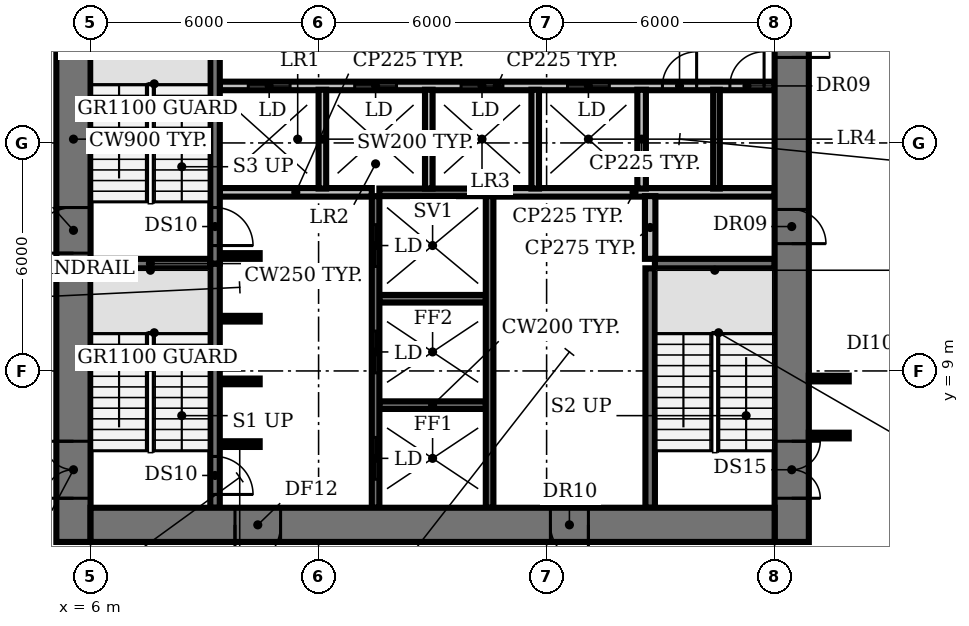
"""IFC4 building model, lengths in metres.
Left out: names, types, materials, properties, quantities, classifications, styles, units other than length and angle.
Written with IfcOpenShell. Run it as: python <this file> out.ifc"""

import sys

from ifc_helpers import new_model, si_unit, direction, frame, frame_2d, origin, place, context, subcontext, project, spatial, rectangle, extrude, element, fill, save


model = new_model("IFC4")
c1 = context("Model", 3, precision=1e-05, world=origin(), true_north=direction((0.0, 1.0)))
c2 = subcontext(c1, "Body", "Model", "MODEL_VIEW")
j1 = project(units=[si_unit("LENGTHUNIT", "METRE"), si_unit("PLANEANGLEUNIT", "RADIAN")], contexts=[c1])
p1 = place(None, origin())
s1 = spatial("IfcSite", under=j1, at=p1, CompositionType="ELEMENT")
p2 = place(p1, origin())
s2 = spatial("IfcBuilding", under=s1, at=p2, CompositionType="ELEMENT")
p3 = place(p2, frame((0.0, 0.0, 58.4)))
s3 = spatial("IfcBuildingStorey", under=s2, at=p3, CompositionType="ELEMENT", Elevation=58.4)
p4 = place(p3, frame((9.4, 7.075, 0.0), z_axis=(0.0, 0.0, 1.0), x_axis=(1.0, 0.0, 0.0)))
e1 = element("IfcWall", 1, at=p4, inside=s3, PredefinedType="SHEAR", context=c2, shape_type="SweptSolid", body=[
    extrude(rectangle(XDim=1.05, YDim=0.15, at=frame_2d((0.525, 0.0))), origin(), (0.0, 0.0, 1.0), 3.85),
])
p5 = place(p3, frame((13.6, 8.1, 0.0), z_axis=(0.0, 0.0, 1.0), x_axis=(1.0, 0.0, 0.0)))
e2 = element("IfcWall", 2, at=p5, inside=s3, PredefinedType="SHEAR", context=c2, shape_type="SweptSolid", body=[
    extrude(rectangle(XDim=2.8, YDim=0.2, at=frame_2d((1.4, 0.0))), origin(), (0.0, 0.0, 1.0), 3.85),
])
for number, where, z_axis, x_axis in (
    (3, (9.4, 8.725, 0.0), (0.0, 0.0, 1.0), (1.0, 0.0, 0.0)),
    (4, (9.4, 10.375, 0.0), (0.0, 0.0, 1.0), (1.0, 0.0, 0.0)),
):
    element("IfcWall", number, at=place(p3, frame(where, z_axis=z_axis, x_axis=x_axis)), inside=s3, PredefinedType="SHEAR", context=c2, shape_type="SweptSolid", body=[
        extrude(rectangle(XDim=1.05, YDim=0.15, at=frame_2d((0.525, 0.0))), origin(), (0.0, 0.0, 1.0), 3.85),
    ])
p6 = place(p3, frame((13.6, 10.9, 0.0), z_axis=(0.0, 0.0, 1.0), x_axis=(1.0, 0.0, 0.0)))
e5 = element("IfcWall", 5, at=p6, inside=s3, PredefinedType="SHEAR", context=c2, shape_type="SweptSolid", body=[
    extrude(rectangle(XDim=2.8, YDim=0.2, at=frame_2d((1.4, 0.0))), origin(), (0.0, 0.0, 1.0), 3.85),
])
for number, where, z_axis, x_axis in (
    (6, (6.0, 11.825, 0.0), (0.0, 0.0, 1.0), (1.0, 0.0, 0.0)),
    (7, (20.85, 11.825, 0.0), (0.0, 0.0, 1.0), (1.0, 0.0, 0.0)),
):
    element("IfcWall", number, at=place(p3, frame(where, z_axis=z_axis, x_axis=x_axis)), inside=s3, PredefinedType="SHEAR", context=c2, shape_type="SweptSolid", body=[
        extrude(rectangle(XDim=3.15, YDim=0.25, at=frame_2d((1.575, 0.0))), origin(), (0.0, 0.0, 1.0), 3.85),
    ])
p7 = place(p3, frame((9.4, 12.025, 0.0), z_axis=(0.0, 0.0, 1.0), x_axis=(1.0, 0.0, 0.0)))
e8 = element("IfcWall", 8, at=p7, inside=s3, PredefinedType="SHEAR", context=c2, shape_type="SweptSolid", body=[
    extrude(rectangle(XDim=1.05, YDim=0.15, at=frame_2d((0.525, 0.0))), origin(), (0.0, 0.0, 1.0), 3.85),
])
p8 = place(p3, frame((9.4, 13.7, 0.0), z_axis=(0.0, 0.0, 1.0), x_axis=(1.0, 0.0, 0.0)))
e9 = element("IfcWall", 9, at=p8, inside=s3, PredefinedType="PARTITIONING", context=c2, shape_type="SweptSolid", body=[
    extrude(rectangle(XDim=4.0, YDim=0.225, at=frame_2d((2.0, 0.0))), origin(), (0.0, 0.0, 1.0), 3.85),
])
p9 = place(p3, frame((13.6, 13.7, 0.0), z_axis=(0.0, 0.0, 1.0), x_axis=(1.0, 0.0, 0.0)))
e10 = element("IfcWall", 10, at=p9, inside=s3, PredefinedType="SHEAR", context=c2, shape_type="SweptSolid", body=[
    extrude(rectangle(XDim=2.8, YDim=0.2, at=frame_2d((1.4, 0.0))), origin(), (0.0, 0.0, 1.0), 3.85),
])
p10 = place(p3, frame((16.6, 13.7, 0.0), z_axis=(0.0, 0.0, 1.0), x_axis=(1.0, 0.0, 0.0)))
e11 = element("IfcWall", 11, at=p10, inside=s3, PredefinedType="PARTITIONING", context=c2, shape_type="SweptSolid", body=[
    extrude(rectangle(XDim=7.4, YDim=0.225, at=frame_2d((3.7, 0.0))), origin(), (0.0, 0.0, 1.0), 3.85),
])
p11 = place(p3, frame((9.4, 16.5, 0.0), z_axis=(0.0, 0.0, 1.0), x_axis=(1.0, 0.0, 0.0)))
e12 = element("IfcWall", 12, at=p11, inside=s3, PredefinedType="PARTITIONING", context=c2, shape_type="SweptSolid", body=[
    extrude(rectangle(XDim=14.6, YDim=0.225, at=frame_2d((7.3, 0.0))), origin(), (0.0, 0.0, 1.0), 3.85),
])
p12 = place(p11, frame((0.75, 0.0, 0.0)))
e13 = element("IfcOpeningElement", 13, at=p12, cuts=e12, PredefinedType="OPENING", context=c2, shape_type="SweptSolid", body=[
    extrude(rectangle(XDim=1.1, YDim=2.1, at=frame_2d((0.55, 1.05))), frame((0.0, 0.123, 0.0), z_axis=(0.0, -1.0, 0.0), x_axis=(1.0, 0.0, 0.0)), (0.0, 0.0, 1.0), 0.245),
])
p13 = place(p11, frame((3.55, 0.0, 0.0)))
e14 = element("IfcOpeningElement", 14, at=p13, cuts=e12, PredefinedType="OPENING", context=c2, shape_type="SweptSolid", body=[
    extrude(rectangle(XDim=1.1, YDim=2.1, at=frame_2d((0.55, 1.05))), frame((0.0, 0.123, 0.0), z_axis=(0.0, -1.0, 0.0), x_axis=(1.0, 0.0, 0.0)), (0.0, 0.0, 1.0), 0.245),
])
p14 = place(p11, frame((6.35, 0.0, 0.0)))
e15 = element("IfcOpeningElement", 15, at=p14, cuts=e12, PredefinedType="OPENING", context=c2, shape_type="SweptSolid", body=[
    extrude(rectangle(XDim=1.1, YDim=2.1, at=frame_2d((0.55, 1.05))), frame((0.0, 0.123, 0.0), z_axis=(0.0, -1.0, 0.0), x_axis=(1.0, 0.0, 0.0)), (0.0, 0.0, 1.0), 0.245),
])
p15 = place(p11, frame((9.15, 0.0, 0.0)))
e16 = element("IfcOpeningElement", 16, at=p15, cuts=e12, PredefinedType="OPENING", context=c2, shape_type="SweptSolid", body=[
    extrude(rectangle(XDim=1.1, YDim=2.1, at=frame_2d((0.55, 1.05))), frame((0.0, 0.123, 0.0), z_axis=(0.0, -1.0, 0.0), x_axis=(1.0, 0.0, 0.0)), (0.0, 0.0, 1.0), 0.245),
])
p16 = place(p11, frame((11.647, 0.0, 0.0)))
e17 = element("IfcOpeningElement", 17, at=p16, cuts=e12, PredefinedType="OPENING", context=c2, shape_type="SweptSolid", body=[
    extrude(rectangle(XDim=0.9, YDim=2.1, at=frame_2d((0.45, 1.05))), frame((0.0, 0.123, 0.0), z_axis=(0.0, -1.0, 0.0), x_axis=(1.0, 0.0, 0.0)), (0.0, 0.0, 1.0), 0.245),
])
p17 = place(p11, frame((13.423, 0.0, 0.0)))
e18 = element("IfcOpeningElement", 18, at=p17, cuts=e12, PredefinedType="OPENING", context=c2, shape_type="SweptSolid", body=[
    extrude(rectangle(XDim=0.9, YDim=2.1, at=frame_2d((0.45, 1.05))), frame((0.0, 0.123, 0.0), z_axis=(0.0, -1.0, 0.0), x_axis=(1.0, 0.0, 0.0)), (0.0, 0.0, 1.0), 0.245),
])
p18 = place(p3, frame((9.275, 11.825, 0.0), z_axis=(0.0, 0.0, 1.0), x_axis=(0.0, -1.0, 0.0)))
e19 = element("IfcWall", 19, at=p18, inside=s3, PredefinedType="SHEAR", context=c2, shape_type="SweptSolid", body=[
    extrude(rectangle(XDim=6.425, YDim=0.25, at=frame_2d((3.212, 0.0))), origin(), (0.0, 0.0, 1.0), 3.85),
])
p19 = place(p18, frame((5.075, 0.0, 0.0)))
e20 = element("IfcOpeningElement", 20, at=p19, cuts=e19, PredefinedType="OPENING", context=c2, shape_type="SweptSolid", body=[
    extrude(rectangle(XDim=1.0, YDim=2.1, at=frame_2d((0.5, 1.05))), frame((0.0, 0.135, 0.0), z_axis=(0.0, -1.0, 0.0), x_axis=(1.0, 0.0, 0.0)), (0.0, 0.0, 1.0), 0.27),
])
p20 = place(p3, frame((9.275, 18.375, 0.0), z_axis=(0.0, 0.0, 1.0), x_axis=(0.0, -1.0, 0.0)))
e21 = element("IfcWall", 21, at=p20, inside=s3, PredefinedType="SHEAR", context=c2, shape_type="SweptSolid", body=[
    extrude(rectangle(XDim=6.55, YDim=0.25, at=frame_2d((3.275, 0.0))), origin(), (0.0, 0.0, 1.0), 3.85),
])
p21 = place(p20, frame((5.075, 0.0, 0.0)))
e22 = element("IfcOpeningElement", 22, at=p21, cuts=e21, PredefinedType="OPENING", context=c2, shape_type="SweptSolid", body=[
    extrude(rectangle(XDim=1.0, YDim=2.1, at=frame_2d((0.5, 1.05))), frame((0.0, 0.135, 0.0), z_axis=(0.0, -1.0, 0.0), x_axis=(1.0, 0.0, 0.0)), (0.0, 0.0, 1.0), 0.27),
])
p22 = place(p3, frame((12.1, 13.8, 0.0), z_axis=(0.0, 0.0, 1.0), x_axis=(0.0, 1.0, 0.0)))
e23 = element("IfcWall", 23, at=p22, inside=s3, PredefinedType="SOLIDWALL", context=c2, shape_type="SweptSolid", body=[
    extrude(rectangle(XDim=2.6, YDim=0.2, at=frame_2d((1.3, 0.0))), origin(), (0.0, 0.0, 1.0), 3.85),
])
p23 = place(p3, frame((13.5, 5.4, 0.0), z_axis=(0.0, 0.0, 1.0), x_axis=(0.0, 1.0, 0.0)))
e24 = element("IfcWall", 24, at=p23, inside=s3, PredefinedType="SHEAR", context=c2, shape_type="SweptSolid", body=[
    extrude(rectangle(XDim=8.2, YDim=0.2, at=frame_2d((4.1, 0.0))), origin(), (0.0, 0.0, 1.0), 3.85),
])
p24 = place(p23, frame((0.75, 0.0, 0.0)))
e25 = element("IfcOpeningElement", 25, at=p24, cuts=e24, PredefinedType="OPENING", context=c2, shape_type="SweptSolid", body=[
    extrude(rectangle(XDim=1.1, YDim=2.1, at=frame_2d((0.55, 1.05))), frame((0.0, 0.11, 0.0), z_axis=(0.0, -1.0, 0.0), x_axis=(1.0, 0.0, 0.0)), (0.0, 0.0, 1.0), 0.22),
])
p25 = place(p23, frame((3.55, 0.0, 0.0)))
e26 = element("IfcOpeningElement", 26, at=p25, cuts=e24, PredefinedType="OPENING", context=c2, shape_type="SweptSolid", body=[
    extrude(rectangle(XDim=1.1, YDim=2.1, at=frame_2d((0.55, 1.05))), frame((0.0, 0.11, 0.0), z_axis=(0.0, -1.0, 0.0), x_axis=(1.0, 0.0, 0.0)), (0.0, 0.0, 1.0), 0.22),
])
p26 = place(p23, frame((6.35, 0.0, 0.0)))
e27 = element("IfcOpeningElement", 27, at=p26, cuts=e24, PredefinedType="OPENING", context=c2, shape_type="SweptSolid", body=[
    extrude(rectangle(XDim=1.1, YDim=2.1, at=frame_2d((0.55, 1.05))), frame((0.0, 0.11, 0.0), z_axis=(0.0, -1.0, 0.0), x_axis=(1.0, 0.0, 0.0)), (0.0, 0.0, 1.0), 0.22),
])
p27 = place(p3, frame((14.9, 13.8, 0.0), z_axis=(0.0, 0.0, 1.0), x_axis=(0.0, 1.0, 0.0)))
e28 = element("IfcWall", 28, at=p27, inside=s3, PredefinedType="SOLIDWALL", context=c2, shape_type="SweptSolid", body=[
    extrude(rectangle(XDim=2.6, YDim=0.2, at=frame_2d((1.3, 0.0))), origin(), (0.0, 0.0, 1.0), 3.85),
])
p28 = place(p3, frame((16.5, 5.4, 0.0), z_axis=(0.0, 0.0, 1.0), x_axis=(0.0, 1.0, 0.0)))
e29 = element("IfcWall", 29, at=p28, inside=s3, PredefinedType="SHEAR", context=c2, shape_type="SweptSolid", body=[
    extrude(rectangle(XDim=8.2, YDim=0.2, at=frame_2d((4.1, 0.0))), origin(), (0.0, 0.0, 1.0), 3.85),
])
p29 = place(p3, frame((17.7, 13.8, 0.0), z_axis=(0.0, 0.0, 1.0), x_axis=(0.0, 1.0, 0.0)))
e30 = element("IfcWall", 30, at=p29, inside=s3, PredefinedType="SOLIDWALL", context=c2, shape_type="SweptSolid", body=[
    extrude(rectangle(XDim=2.6, YDim=0.2, at=frame_2d((1.3, 0.0))), origin(), (0.0, 0.0, 1.0), 3.85),
])
p30 = place(p3, frame((20.5, 13.8, 0.0), z_axis=(0.0, 0.0, 1.0), x_axis=(0.0, 1.0, 0.0)))
e31 = element("IfcWall", 31, at=p30, inside=s3, PredefinedType="PARTITIONING", context=c2, shape_type="SweptSolid", body=[
    extrude(rectangle(XDim=2.6, YDim=0.225, at=frame_2d((1.3, 0.0))), origin(), (0.0, 0.0, 1.0), 3.85),
])
p31 = place(p3, frame((20.725, 5.4, 0.0), z_axis=(0.0, 0.0, 1.0), x_axis=(0.0, 1.0, 0.0)))
e32 = element("IfcWall", 32, at=p31, inside=s3, PredefinedType="SHEAR", context=c2, shape_type="SweptSolid", body=[
    extrude(rectangle(XDim=6.3, YDim=0.25, at=frame_2d((3.15, 0.0))), origin(), (0.0, 0.0, 1.0), 3.85),
])
p32 = place(p3, frame((20.725, 11.95, 0.0), z_axis=(0.0, 0.0, 1.0), x_axis=(0.0, 1.0, 0.0)))
e33 = element("IfcWall", 33, at=p32, inside=s3, PredefinedType="PARTITIONING", context=c2, shape_type="SweptSolid", body=[
    extrude(rectangle(XDim=1.65, YDim=0.275, at=frame_2d((0.825, 0.0))), origin(), (0.0, 0.0, 1.0), 3.85),
])
p33 = place(p3, frame((22.47, 13.8, 0.0), z_axis=(0.0, 0.0, 1.0), x_axis=(0.0, 1.0, 0.0)))
e34 = element("IfcWall", 34, at=p33, inside=s3, PredefinedType="PARTITIONING", context=c2, shape_type="SweptSolid", body=[
    extrude(rectangle(XDim=2.6, YDim=0.175, at=frame_2d((1.3, 0.0))), origin(), (0.0, 0.0, 1.0), 3.85),
])
p34 = place(p3, frame((5.55, 4.5, 0.0), z_axis=(0.0, 0.0, 1.0), x_axis=(0.0, 1.0, 0.0)))
e35 = element("IfcWall", 35, at=p34, inside=s3, PredefinedType="SHEAR", context=c2, shape_type="SweptSolid", body=[
    extrude(rectangle(XDim=21.2, YDim=0.9, at=frame_2d((10.6, 0.0))), origin(), (0.0, 0.0, 1.0), 3.85),
])
p35 = place(p34, frame((1.15, 0.0, 0.0)))
e36 = element("IfcOpeningElement", 36, at=p35, cuts=e35, PredefinedType="OPENING", context=c2, shape_type="SweptSolid", body=[
    extrude(rectangle(XDim=1.5, YDim=2.1, at=frame_2d((0.75, 1.05))), frame((0.0, 0.46, 0.0), z_axis=(0.0, -1.0, 0.0), x_axis=(1.0, 0.0, 0.0)), (0.0, 0.0, 1.0), 0.92),
])
p36 = place(p34, frame((7.6, 0.0, 0.0)))
e37 = element("IfcOpeningElement", 37, at=p36, cuts=e35, PredefinedType="OPENING", context=c2, shape_type="SweptSolid", body=[
    extrude(rectangle(XDim=1.2, YDim=2.1, at=frame_2d((0.6, 1.05))), frame((0.0, 0.46, 0.0), z_axis=(0.0, -1.0, 0.0), x_axis=(1.0, 0.0, 0.0)), (0.0, 0.0, 1.0), 0.92),
])
p37 = place(p34, frame((14.15, 0.0, 0.0)))
e38 = element("IfcOpeningElement", 38, at=p37, cuts=e35, PredefinedType="OPENING", context=c2, shape_type="SweptSolid", body=[
    extrude(rectangle(XDim=1.2, YDim=2.1, at=frame_2d((0.6, 1.05))), frame((0.0, 0.46, 0.0), z_axis=(0.0, -1.0, 0.0), x_axis=(1.0, 0.0, 0.0)), (0.0, 0.0, 1.0), 0.92),
])
p38 = place(p3, frame((24.45, 25.7, 0.0), z_axis=(0.0, 0.0, 1.0), x_axis=(0.0, -1.0, 0.0)))
e39 = element("IfcWall", 39, at=p38, inside=s3, PredefinedType="SHEAR", context=c2, shape_type="SweptSolid", body=[
    extrude(rectangle(XDim=21.2, YDim=0.9, at=frame_2d((10.6, 0.0))), origin(), (0.0, 0.0, 1.0), 3.85),
])
p39 = place(p38, frame((18.55, 0.0, 0.0)))
e40 = element("IfcOpeningElement", 40, at=p39, cuts=e39, PredefinedType="OPENING", context=c2, shape_type="SweptSolid", body=[
    extrude(rectangle(XDim=1.5, YDim=2.1, at=frame_2d((0.75, 1.05))), frame((0.0, 0.46, 0.0), z_axis=(0.0, -1.0, 0.0), x_axis=(1.0, 0.0, 0.0)), (0.0, 0.0, 1.0), 0.92),
])
p40 = place(p38, frame((12.45, 0.0, 0.0)))
e41 = element("IfcOpeningElement", 41, at=p40, cuts=e39, PredefinedType="OPENING", context=c2, shape_type="SweptSolid", body=[
    extrude(rectangle(XDim=0.9, YDim=2.1, at=frame_2d((0.45, 1.05))), frame((0.0, 0.46, 0.0), z_axis=(0.0, -1.0, 0.0), x_axis=(1.0, 0.0, 0.0)), (0.0, 0.0, 1.0), 0.92),
])
p41 = place(p38, frame((6.45, 0.0, 0.0)))
e42 = element("IfcOpeningElement", 42, at=p41, cuts=e39, PredefinedType="OPENING", context=c2, shape_type="SweptSolid", body=[
    extrude(rectangle(XDim=2.0, YDim=2.1, at=frame_2d((1.0, 1.05))), frame((0.0, 0.46, 0.0), z_axis=(0.0, -1.0, 0.0), x_axis=(1.0, 0.0, 0.0)), (0.0, 0.0, 1.0), 0.92),
])
p42 = place(p3, frame((24.0, 4.95, 0.0), z_axis=(0.0, 0.0, 1.0), x_axis=(-1.0, 0.0, 0.0)))
e43 = element("IfcWall", 43, at=p42, inside=s3, PredefinedType="SHEAR", context=c2, shape_type="SweptSolid", body=[
    extrude(rectangle(XDim=18.0, YDim=0.9, at=frame_2d((9.0, 0.0))), origin(), (0.0, 0.0, 1.0), 3.85),
])
p43 = place(p42, frame((13.0, 0.0, 0.0)))
e44 = element("IfcOpeningElement", 44, at=p43, cuts=e43, PredefinedType="OPENING", context=c2, shape_type="SweptSolid", body=[
    extrude(rectangle(XDim=1.2, YDim=2.1, at=frame_2d((0.6, 1.05))), frame((0.0, 0.46, 0.0), z_axis=(0.0, -1.0, 0.0), x_axis=(1.0, 0.0, 0.0)), (0.0, 0.0, 1.0), 0.92),
])
p44 = place(p42, frame((4.9, 0.0, 0.0)))
e45 = element("IfcOpeningElement", 45, at=p44, cuts=e43, PredefinedType="OPENING", context=c2, shape_type="SweptSolid", body=[
    extrude(rectangle(XDim=1.0, YDim=2.1, at=frame_2d((0.5, 1.05))), frame((0.0, 0.46, 0.0), z_axis=(0.0, -1.0, 0.0), x_axis=(1.0, 0.0, 0.0)), (0.0, 0.0, 1.0), 0.92),
])
for number, where, z_axis, x_axis in (
    (46, (24.9, 7.3, 0.0), (0.0, 0.0, 1.0), (1.0, 0.0, 0.0)),
    (47, (24.9, 8.8, 0.0), (0.0, 0.0, 1.0), (1.0, 0.0, 0.0)),
):
    element("IfcWall", number, at=place(p3, frame(where, z_axis=z_axis, x_axis=x_axis)), inside=s3, PredefinedType="PARTITIONING", context=c2, shape_type="SweptSolid", body=[
        extrude(rectangle(XDim=1.05, YDim=0.15, at=frame_2d((0.525, 0.0))), origin(), (0.0, 0.0, 1.0), 2.83),
    ])
p45 = place(p12, origin())
e48 = element("IfcDoor", 48, at=p45, inside=s3, OperationType="DOUBLE_DOOR_SLIDING", PredefinedType="DOOR", context=c2, shape_type="SweptSolid", body=[
    extrude(rectangle(XDim=1.1, YDim=2.1, at=frame_2d((0.55, 1.05))), frame((0.0, 0.025, 0.0), z_axis=(0.0, -1.0, 0.0), x_axis=(1.0, 0.0, 0.0)), (0.0, 0.0, 1.0), 0.05),
])
fill(e13, e48)
p46 = place(p13, origin())
e49 = element("IfcDoor", 49, at=p46, inside=s3, OperationType="DOUBLE_DOOR_SLIDING", PredefinedType="DOOR", context=c2, shape_type="SweptSolid", body=[
    extrude(rectangle(XDim=1.1, YDim=2.1, at=frame_2d((0.55, 1.05))), frame((0.0, 0.025, 0.0), z_axis=(0.0, -1.0, 0.0), x_axis=(1.0, 0.0, 0.0)), (0.0, 0.0, 1.0), 0.05),
])
fill(e14, e49)
p47 = place(p14, origin())
e50 = element("IfcDoor", 50, at=p47, inside=s3, OperationType="DOUBLE_DOOR_SLIDING", PredefinedType="DOOR", context=c2, shape_type="SweptSolid", body=[
    extrude(rectangle(XDim=1.1, YDim=2.1, at=frame_2d((0.55, 1.05))), frame((0.0, 0.025, 0.0), z_axis=(0.0, -1.0, 0.0), x_axis=(1.0, 0.0, 0.0)), (0.0, 0.0, 1.0), 0.05),
])
fill(e15, e50)
p48 = place(p15, origin())
e51 = element("IfcDoor", 51, at=p48, inside=s3, OperationType="DOUBLE_DOOR_SLIDING", PredefinedType="DOOR", context=c2, shape_type="SweptSolid", body=[
    extrude(rectangle(XDim=1.1, YDim=2.1, at=frame_2d((0.55, 1.05))), frame((0.0, 0.025, 0.0), z_axis=(0.0, -1.0, 0.0), x_axis=(1.0, 0.0, 0.0)), (0.0, 0.0, 1.0), 0.05),
])
fill(e16, e51)
p49 = place(p16, origin())
e52 = element("IfcDoor", 52, at=p49, inside=s3, OperationType="SINGLE_SWING_RIGHT", PredefinedType="DOOR", context=c2, shape_type="SweptSolid", body=[
    extrude(rectangle(XDim=0.9, YDim=2.1, at=frame_2d((0.45, 1.05))), frame((0.0, 0.025, 0.0), z_axis=(0.0, -1.0, 0.0), x_axis=(1.0, 0.0, 0.0)), (0.0, 0.0, 1.0), 0.05),
])
fill(e17, e52)
p50 = place(p17, origin())
e53 = element("IfcDoor", 53, at=p50, inside=s3, OperationType="SINGLE_SWING_RIGHT", PredefinedType="DOOR", context=c2, shape_type="SweptSolid", body=[
    extrude(rectangle(XDim=0.9, YDim=2.1, at=frame_2d((0.45, 1.05))), frame((0.0, 0.025, 0.0), z_axis=(0.0, -1.0, 0.0), x_axis=(1.0, 0.0, 0.0)), (0.0, 0.0, 1.0), 0.05),
])
fill(e18, e53)
p51 = place(p19, origin())
e54 = element("IfcDoor", 54, at=p51, inside=s3, OperationType="SINGLE_SWING_RIGHT", PredefinedType="DOOR", context=c2, shape_type="SweptSolid", body=[
    extrude(rectangle(XDim=1.0, YDim=2.1, at=frame_2d((0.5, 1.05))), frame((0.0, 0.025, 0.0), z_axis=(0.0, -1.0, 0.0), x_axis=(1.0, 0.0, 0.0)), (0.0, 0.0, 1.0), 0.05),
])
fill(e20, e54)
p52 = place(p21, origin())
e55 = element("IfcDoor", 55, at=p52, inside=s3, OperationType="SINGLE_SWING_RIGHT", PredefinedType="DOOR", context=c2, shape_type="SweptSolid", body=[
    extrude(rectangle(XDim=1.0, YDim=2.1, at=frame_2d((0.5, 1.05))), frame((0.0, 0.025, 0.0), z_axis=(0.0, -1.0, 0.0), x_axis=(1.0, 0.0, 0.0)), (0.0, 0.0, 1.0), 0.05),
])
fill(e22, e55)
p53 = place(p24, origin())
e56 = element("IfcDoor", 56, at=p53, inside=s3, OperationType="DOUBLE_DOOR_SLIDING", PredefinedType="DOOR", context=c2, shape_type="SweptSolid", body=[
    extrude(rectangle(XDim=1.1, YDim=2.1, at=frame_2d((0.55, 1.05))), frame((0.0, 0.025, 0.0), z_axis=(0.0, -1.0, 0.0), x_axis=(1.0, 0.0, 0.0)), (0.0, 0.0, 1.0), 0.05),
])
fill(e25, e56)
p54 = place(p25, origin())
e57 = element("IfcDoor", 57, at=p54, inside=s3, OperationType="DOUBLE_DOOR_SLIDING", PredefinedType="DOOR", context=c2, shape_type="SweptSolid", body=[
    extrude(rectangle(XDim=1.1, YDim=2.1, at=frame_2d((0.55, 1.05))), frame((0.0, 0.025, 0.0), z_axis=(0.0, -1.0, 0.0), x_axis=(1.0, 0.0, 0.0)), (0.0, 0.0, 1.0), 0.05),
])
fill(e26, e57)
p55 = place(p26, origin())
e58 = element("IfcDoor", 58, at=p55, inside=s3, OperationType="DOUBLE_DOOR_SLIDING", PredefinedType="DOOR", context=c2, shape_type="SweptSolid", body=[
    extrude(rectangle(XDim=1.1, YDim=2.1, at=frame_2d((0.55, 1.05))), frame((0.0, 0.025, 0.0), z_axis=(0.0, -1.0, 0.0), x_axis=(1.0, 0.0, 0.0)), (0.0, 0.0, 1.0), 0.05),
])
fill(e27, e58)
p56 = place(p35, origin())
e59 = element("IfcDoor", 59, at=p56, inside=s3, OperationType="DOUBLE_DOOR_SINGLE_SWING", PredefinedType="DOOR", context=c2, shape_type="SweptSolid", body=[
    extrude(rectangle(XDim=1.5, YDim=2.1, at=frame_2d((0.75, 1.05))), frame((0.0, 0.025, 0.0), z_axis=(0.0, -1.0, 0.0), x_axis=(1.0, 0.0, 0.0)), (0.0, 0.0, 1.0), 0.05),
])
fill(e36, e59)
p57 = place(p36, origin())
e60 = element("IfcDoor", 60, at=p57, inside=s3, OperationType="SINGLE_SWING_LEFT", PredefinedType="DOOR", context=c2, shape_type="SweptSolid", body=[
    extrude(rectangle(XDim=1.2, YDim=2.1, at=frame_2d((0.6, 1.05))), frame((0.0, 0.025, 0.0), z_axis=(0.0, -1.0, 0.0), x_axis=(1.0, 0.0, 0.0)), (0.0, 0.0, 1.0), 0.05),
])
fill(e37, e60)
p58 = place(p39, origin())
e61 = element("IfcDoor", 61, at=p58, inside=s3, OperationType="DOUBLE_DOOR_SINGLE_SWING", PredefinedType="DOOR", context=c2, shape_type="SweptSolid", body=[
    extrude(rectangle(XDim=1.5, YDim=2.1, at=frame_2d((0.75, 1.05))), frame((0.0, 0.025, 0.0), z_axis=(0.0, -1.0, 0.0), x_axis=(1.0, 0.0, 0.0)), (0.0, 0.0, 1.0), 0.05),
])
fill(e40, e61)
p59 = place(p40, origin())
e62 = element("IfcDoor", 62, at=p59, inside=s3, OperationType="SINGLE_SWING_RIGHT", PredefinedType="DOOR", context=c2, shape_type="SweptSolid", body=[
    extrude(rectangle(XDim=0.9, YDim=2.1, at=frame_2d((0.45, 1.05))), frame((0.0, -0.39, 0.0), z_axis=(0.0, -1.0, 0.0), x_axis=(1.0, 0.0, 0.0)), (0.0, 0.0, 1.0), 0.05),
])
fill(e41, e62)
p60 = place(p41, origin())
e63 = element("IfcDoor", 63, at=p60, inside=s3, OperationType="DOUBLE_DOOR_SINGLE_SWING", PredefinedType="DOOR", context=c2, shape_type="SweptSolid", body=[
    extrude(rectangle(XDim=2.0, YDim=2.1, at=frame_2d((1.0, 1.05))), frame((0.0, 0.025, 0.0), z_axis=(0.0, -1.0, 0.0), x_axis=(1.0, 0.0, 0.0)), (0.0, 0.0, 1.0), 0.05),
])
fill(e42, e63)
p61 = place(p43, origin())
e64 = element("IfcDoor", 64, at=p61, inside=s3, OperationType="SINGLE_SWING_RIGHT", PredefinedType="DOOR", context=c2, shape_type="SweptSolid", body=[
    extrude(rectangle(XDim=1.2, YDim=2.1, at=frame_2d((0.6, 1.05))), frame((0.0, 0.025, 0.0), z_axis=(0.0, -1.0, 0.0), x_axis=(1.0, 0.0, 0.0)), (0.0, 0.0, 1.0), 0.05),
])
fill(e44, e64)
p62 = place(p44, origin())
e65 = element("IfcDoor", 65, at=p62, inside=s3, OperationType="SINGLE_SWING_LEFT", PredefinedType="DOOR", context=c2, shape_type="SweptSolid", body=[
    extrude(rectangle(XDim=1.0, YDim=2.1, at=frame_2d((0.5, 1.05))), frame((0.0, -0.39, 0.0), z_axis=(0.0, -1.0, 0.0), x_axis=(1.0, 0.0, 0.0)), (0.0, 0.0, 1.0), 0.05),
])
fill(e45, e65)
save(model, sys.argv[1])
